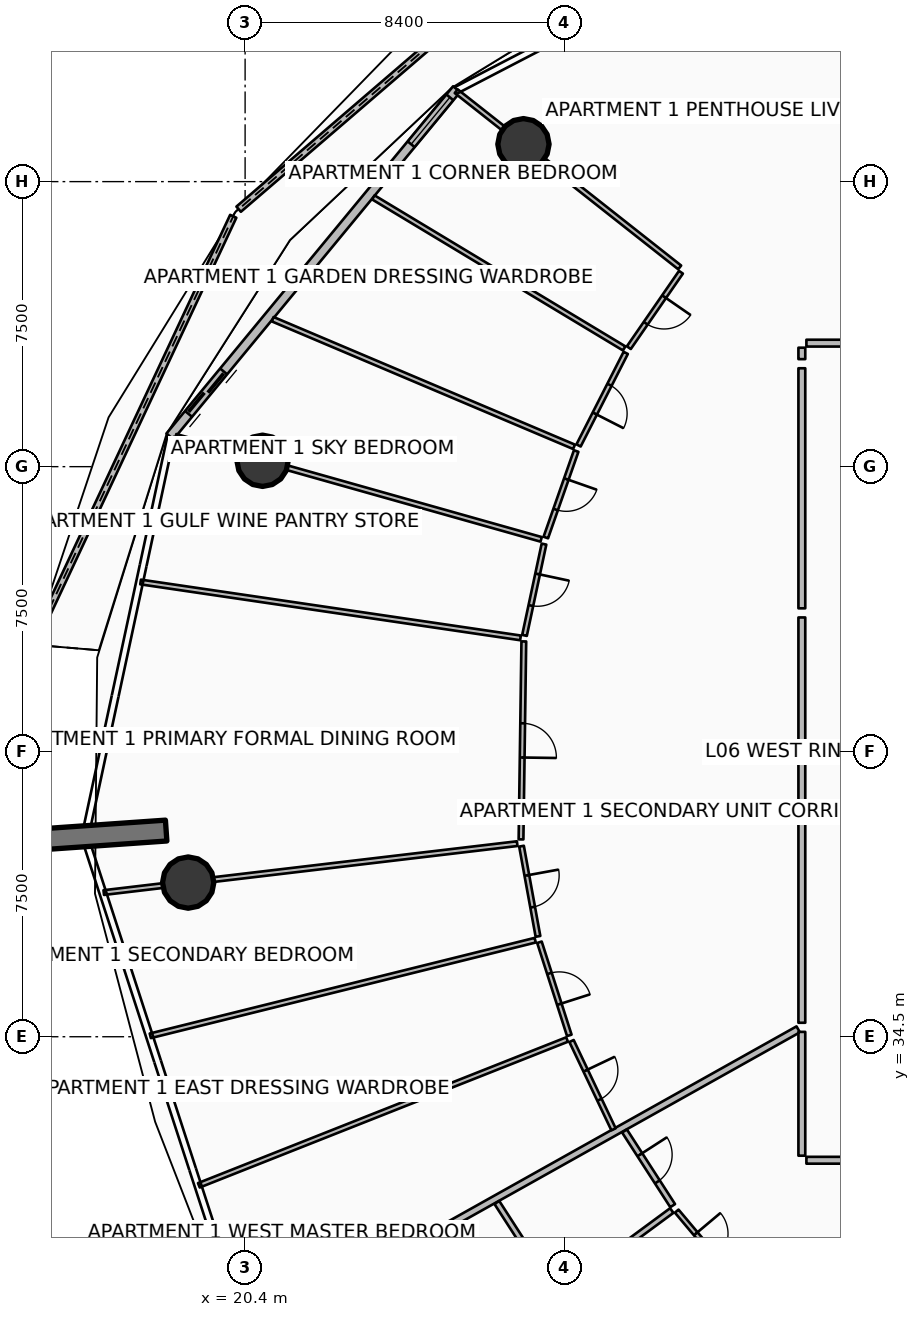
"""IFC4 building model, lengths in metres.
Left out: names, types, materials, properties, quantities, classifications, styles, units other than length and angle.
Written with IfcOpenShell. Run it as: python <this file> out.ifc"""

import sys

from ifc_helpers import new_model, si_unit, direction, frame, frame_2d, origin, origin_2d, place, context, subcontext, project, spatial, polyline, rectangle, circle, outline, extrude, element, fill, save


model = new_model("IFC4")
c1 = context("Model", 3, precision=1e-05, world=origin(), true_north=direction((0.0, 1.0)))
c2 = subcontext(c1, "Body", "Model", "MODEL_VIEW")
j1 = project(units=[si_unit("LENGTHUNIT", "METRE"), si_unit("PLANEANGLEUNIT", "RADIAN")], contexts=[c1])
p1 = place(None, origin())
s1 = spatial("IfcSite", under=j1, at=p1, CompositionType="ELEMENT")
p2 = place(p1, origin())
s2 = spatial("IfcBuilding", under=s1, at=p2, CompositionType="ELEMENT")
p3 = place(p2, frame((0.0, 0.0, 30.15)))
s3 = spatial("IfcBuildingStorey", under=s2, at=p3, CompositionType="ELEMENT", Elevation=30.15)
p4 = place(p3, frame((18.322, 39.925, 0.0), z_axis=(0.0, 0.0, 1.0), x_axis=(-0.997564163539, -0.069754853754, 0.0)))
e1 = element("IfcWall", 1, at=p4, inside=s3, PredefinedType="SOLIDWALL", context=c2, shape_type="SweptSolid", body=[
    extrude(rectangle(XDim=3.5, YDim=0.55, at=frame_2d((1.75, 0.0))), origin(), (0.0, 0.0, 1.0), 3.75),
])
for number, where, z_axis, x_axis in (
    (2, (27.724, 57.984, 0.0), (0.0, 0.0, 1.0), (1.0, 0.0, 0.0)),
    (3, (20.859, 49.655, 0.0), (0.0, 0.0, 1.0), (1.0, 0.0, 0.0)),
    (4, (18.902, 38.556, 0.0), (0.0, 0.0, 1.0), (1.0, 0.0, 0.0)),
):
    element("IfcColumn", number, at=place(p3, frame(where, z_axis=z_axis, x_axis=x_axis)), inside=s3, PredefinedType="COLUMN", context=c2, shape_type="SweptSolid", body=[
        extrude(circle(Radius=0.675, at=origin_2d()), origin(), (0.0, 0.0, 1.0), 3.5),
    ])
p5 = place(p3, frame((29.08, 63.881, 0.0), z_axis=(0.0, 0.0, 1.0), x_axis=(-0.758371329303, -0.651822772609, 0.0)))
e5 = element("IfcWall", 5, at=p5, inside=s3, PredefinedType="PARAPET", context=c2, shape_type="SweptSolid", body=[
    extrude(outline(polyline([(0.0, 0.0), (11.67, 0.0), (11.67, 1.148), (5.835, 1.284), (0.0, 1.483), (0.0, 0.0)])), frame((0.0, 0.09, 0.0), z_axis=(0.0, -1.0, 0.0), x_axis=(1.0, 0.0, 0.0)), (0.0, 0.0, 1.0), 0.18),
])
p6 = place(p3, frame((20.088, 56.087, 0.0), z_axis=(0.0, 0.0, 1.0), x_axis=(-0.424187605295, -0.905574334615, 0.0)))
e6 = element("IfcWall", 6, at=p6, inside=s3, PredefinedType="PARAPET", context=c2, shape_type="SweptSolid", body=[
    extrude(outline(polyline([(0.0, 0.0), (12.446, 0.0), (12.446, 1.224), (6.223, 1.127), (0.0, 1.148), (0.0, 0.0)])), frame((0.0, 0.09, 0.0), z_axis=(0.0, -1.0, 0.0), x_axis=(1.0, 0.0, 0.0)), (0.0, 0.0, 1.0), 0.18),
])
p7 = place(p3, frame((25.967, 59.433, 0.0), z_axis=(0.0, 0.0, 1.0), x_axis=(-0.636674332663, -0.771132799281, 0.0)))
e7 = element("IfcWall", 7, at=p7, inside=s3, PredefinedType="SOLIDWALL", context=c2, shape_type="SweptSolid", body=[
    extrude(rectangle(XDim=11.851, YDim=0.24, at=frame_2d((5.926, 0.0))), origin(), (0.0, 0.0, 1.0), 2.45),
])
p8 = place(p7, frame((9.631, 0.0, 0.0)))
e8 = element("IfcOpeningElement", 8, at=p8, cuts=e7, PredefinedType="OPENING", context=c2, shape_type="SweptSolid", body=[
    extrude(rectangle(XDim=1.45, YDim=2.15, at=frame_2d((0.725, 1.075))), frame((0.0, 0.13, 0.0), z_axis=(0.0, -1.0, 0.0), x_axis=(1.0, 0.0, 0.0)), (0.0, 0.0, 1.0), 0.26),
])
p9 = place(p7, frame((0.28, 0.0, 0.65)))
e9 = element("IfcOpeningElement", 9, at=p9, cuts=e7, PredefinedType="OPENING", context=c2, shape_type="SweptSolid", body=[
    extrude(rectangle(XDim=1.6, YDim=1.5, at=frame_2d((0.8, 0.75))), frame((0.0, 0.13, 0.0), z_axis=(0.0, -1.0, 0.0), x_axis=(1.0, 0.0, 0.0)), (0.0, 0.0, 1.0), 0.26),
])
p10 = place(p3, frame((34.954, 34.694, 0.0), z_axis=(0.0, 0.0, 1.0), x_axis=(-0.872493465611, -0.488625779577, 0.0)))
e10 = element("IfcWall", 10, at=p10, inside=s3, PredefinedType="PARTITIONING", context=c2, shape_type="SweptSolid", body=[
    extrude(rectangle(XDim=16.586, YDim=0.18, at=frame_2d((8.293, 0.0))), origin(), (0.0, 0.0, 1.0), 2.867),
])
p11 = place(p3, frame((41.86, 52.75, 0.0), z_axis=(0.0, 0.0, 1.0), x_axis=(-1.0, 0.0, 0.0)))
e11 = element("IfcWall", 11, at=p11, inside=s3, PredefinedType="PARTITIONING", context=c2, shape_type="SweptSolid", body=[
    extrude(rectangle(XDim=6.69, YDim=0.18, at=frame_2d((3.345, 0.0))), origin(), (0.0, 0.0, 1.0), 2.867),
])
p12 = place(p11, frame((2.795, 0.0, 0.0)))
e12 = element("IfcOpeningElement", 12, at=p12, cuts=e11, PredefinedType="OPENING", context=c2, shape_type="SweptSolid", body=[
    extrude(rectangle(XDim=1.1, YDim=2.1, at=frame_2d((0.55, 1.05))), frame((0.0, 0.1, 0.0), z_axis=(0.0, -1.0, 0.0), x_axis=(1.0, 0.0, 0.0)), (0.0, 0.0, 1.0), 0.2),
])
p13 = place(p3, frame((35.05, 52.63, 0.0), z_axis=(0.0, 0.0, 1.0), x_axis=(0.0, -1.0, 0.0)))
e13 = element("IfcWall", 13, at=p13, inside=s3, PredefinedType="PARTITIONING", context=c2, shape_type="SweptSolid", body=[
    extrude(rectangle(XDim=0.301, YDim=0.18, at=frame_2d((0.15, 0.0))), origin(), (0.0, 0.0, 1.0), 2.867),
])
p14 = place(p3, frame((37.943, 59.958, 0.0), z_axis=(0.0, 0.0, 1.0), x_axis=(-0.488606395453, 0.872504321091, 0.0)))
e14 = element("IfcWall", 14, at=p14, inside=s3, PredefinedType="PARTITIONING", context=c2, shape_type="SweptSolid", body=[
    extrude(rectangle(XDim=4.913, YDim=0.125, at=frame_2d((2.457, 0.0))), origin(), (0.0, 0.0, 1.0), 2.867),
])
p15 = place(p3, frame((35.05, 52.089, 0.0), z_axis=(0.0, 0.0, 1.0), x_axis=(0.0, -1.0, 0.0)))
e15 = element("IfcWall", 15, at=p15, inside=s3, PredefinedType="PARTITIONING", context=c2, shape_type="SweptSolid", body=[
    extrude(rectangle(XDim=6.317, YDim=0.18, at=frame_2d((3.158, 0.0))), origin(), (0.0, 0.0, 1.0), 2.867),
])
p16 = place(p3, frame((31.836, 54.743, 0.0), z_axis=(0.0, 0.0, 1.0), x_axis=(-0.785333171854, 0.619073347178, 0.0)))
e16 = element("IfcWall", 16, at=p16, inside=s3, PredefinedType="PARTITIONING", context=c2, shape_type="SweptSolid", body=[
    extrude(rectangle(XDim=7.489, YDim=0.125, at=frame_2d((3.745, 0.0))), origin(), (0.0, 0.0, 1.0), 2.867),
])
p17 = place(p3, frame((30.375, 52.611, 0.0), z_axis=(0.0, 0.0, 1.0), x_axis=(-0.856697740307, 0.515818748936, 0.0)))
e17 = element("IfcWall", 17, at=p17, inside=s3, PredefinedType="PARTITIONING", context=c2, shape_type="SweptSolid", body=[
    extrude(rectangle(XDim=7.704, YDim=0.125, at=frame_2d((3.852, 0.0))), origin(), (0.0, 0.0, 1.0), 2.94),
])
p18 = place(p3, frame((29.055, 50.022, 0.0), z_axis=(0.0, 0.0, 1.0), x_axis=(-0.920841617163, 0.389936810395, 0.0)))
e18 = element("IfcWall", 18, at=p18, inside=s3, PredefinedType="PARTITIONING", context=c2, shape_type="SweptSolid", body=[
    extrude(rectangle(XDim=8.613, YDim=0.125, at=frame_2d((4.306, 0.0))), origin(), (0.0, 0.0, 1.0), 2.94),
])
p19 = place(p3, frame((31.869, 54.615, 0.0), z_axis=(0.0, 0.0, 1.0), x_axis=(-0.568588801709, -0.822621890404, 0.0)))
e19 = element("IfcWall", 19, at=p19, inside=s3, PredefinedType="PARTITIONING", context=c2, shape_type="SweptSolid", body=[
    extrude(rectangle(XDim=2.412, YDim=0.125, at=frame_2d((1.206, 0.0))), origin(), (0.0, 0.0, 1.0), 2.867),
])
p20 = place(p19, frame((0.781, 0.0, 0.0)))
e20 = element("IfcOpeningElement", 20, at=p20, cuts=e19, PredefinedType="OPENING", context=c2, shape_type="SweptSolid", body=[
    extrude(rectangle(XDim=0.85, YDim=2.06, at=frame_2d((0.425, 1.03))), frame((0.0, 0.073, 0.0), z_axis=(0.0, -1.0, 0.0), x_axis=(1.0, 0.0, 0.0)), (0.0, 0.0, 1.0), 0.145),
])
p21 = place(p3, frame((30.416, 52.493, 0.0), z_axis=(0.0, 0.0, 1.0), x_axis=(-0.454024795493, -0.890989048798, 0.0)))
e21 = element("IfcWall", 21, at=p21, inside=s3, PredefinedType="PARTITIONING", context=c2, shape_type="SweptSolid", body=[
    extrude(rectangle(XDim=2.733, YDim=0.125, at=frame_2d((1.367, 0.0))), origin(), (0.0, 0.0, 1.0), 2.94),
])
p22 = place(p21, frame((0.942, 0.0, 0.0)))
e22 = element("IfcOpeningElement", 22, at=p22, cuts=e21, PredefinedType="OPENING", context=c2, shape_type="SweptSolid", body=[
    extrude(rectangle(XDim=0.85, YDim=2.06, at=frame_2d((0.425, 1.03))), frame((0.0, 0.073, 0.0), z_axis=(0.0, -1.0, 0.0), x_axis=(1.0, 0.0, 0.0)), (0.0, 0.0, 1.0), 0.145),
])
p23 = place(p3, frame((29.112, 49.911, 0.0), z_axis=(0.0, 0.0, 1.0), x_axis=(-0.331369117911, -0.943501196446, 0.0)))
e23 = element("IfcWall", 23, at=p23, inside=s3, PredefinedType="PARTITIONING", context=c2, shape_type="SweptSolid", body=[
    extrude(rectangle(XDim=2.412, YDim=0.125, at=frame_2d((1.206, 0.0))), origin(), (0.0, 0.0, 1.0), 2.867),
])
p24 = place(p23, frame((0.781, 0.0, 0.0)))
e24 = element("IfcOpeningElement", 24, at=p24, cuts=e23, PredefinedType="OPENING", context=c2, shape_type="SweptSolid", body=[
    extrude(rectangle(XDim=0.85, YDim=2.06, at=frame_2d((0.425, 1.03))), frame((0.0, 0.073, 0.0), z_axis=(0.0, -1.0, 0.0), x_axis=(1.0, 0.0, 0.0)), (0.0, 0.0, 1.0), 0.145),
])
p25 = place(p3, frame((35.05, 45.532, 0.0), z_axis=(0.0, 0.0, 1.0), x_axis=(0.0, -1.0, 0.0)))
e25 = element("IfcWall", 25, at=p25, inside=s3, PredefinedType="PARTITIONING", context=c2, shape_type="SweptSolid", body=[
    extrude(rectangle(XDim=4.945, YDim=0.18, at=frame_2d((2.472, 0.0))), origin(), (0.0, 0.0, 1.0), 2.867),
])
p26 = place(p3, frame((28.19, 47.587, 0.0), z_axis=(0.0, 0.0, 1.0), x_axis=(-0.962452458747, 0.271450298675, 0.0)))
e26 = element("IfcWall", 26, at=p26, inside=s3, PredefinedType="PARTITIONING", context=c2, shape_type="SweptSolid", body=[
    extrude(rectangle(XDim=9.991, YDim=0.125, at=frame_2d((4.996, 0.0))), origin(), (0.0, 0.0, 1.0), 2.867),
])
p27 = place(p3, frame((27.646, 44.995, 0.0), z_axis=(0.0, 0.0, 1.0), x_axis=(-0.989346856364, 0.145577463234, 0.0)))
e27 = element("IfcWall", 27, at=p27, inside=s3, PredefinedType="PARTITIONING", context=c2, shape_type="SweptSolid", body=[
    extrude(rectangle(XDim=10.104, YDim=0.125, at=frame_2d((5.052, 0.0))), origin(), (0.0, 0.0, 1.0), 2.94),
])
p28 = place(p3, frame((28.265, 47.462, 0.0), z_axis=(0.0, 0.0, 1.0), x_axis=(-0.20890462523, -0.977936019153, 0.0)))
e28 = element("IfcWall", 28, at=p28, inside=s3, PredefinedType="PARTITIONING", context=c2, shape_type="SweptSolid", body=[
    extrude(rectangle(XDim=2.457, YDim=0.125, at=frame_2d((1.228, 0.0))), origin(), (0.0, 0.0, 1.0), 2.867),
])
p29 = place(p28, frame((0.803, 0.0, 0.0)))
e29 = element("IfcOpeningElement", 29, at=p29, cuts=e28, PredefinedType="OPENING", context=c2, shape_type="SweptSolid", body=[
    extrude(rectangle(XDim=0.85, YDim=2.06, at=frame_2d((0.425, 1.03))), frame((0.0, 0.073, 0.0), z_axis=(0.0, -1.0, 0.0), x_axis=(1.0, 0.0, 0.0)), (0.0, 0.0, 1.0), 0.145),
])
p30 = place(p3, frame((27.734, 44.902, 0.0), z_axis=(0.0, 0.0, 1.0), x_axis=(-0.014152399805, -0.999899849775, 0.0)))
e30 = element("IfcWall", 30, at=p30, inside=s3, PredefinedType="PARTITIONING", context=c2, shape_type="SweptSolid", body=[
    extrude(rectangle(XDim=5.21, YDim=0.125, at=frame_2d((2.605, 0.0))), origin(), (0.0, 0.0, 1.0), 2.867),
])
p31 = place(p30, frame((2.155, 0.0, 0.0)))
e31 = element("IfcOpeningElement", 31, at=p31, cuts=e30, PredefinedType="OPENING", context=c2, shape_type="SweptSolid", body=[
    extrude(rectangle(XDim=0.9, YDim=2.08, at=frame_2d((0.45, 1.04))), frame((0.0, 0.073, 0.0), z_axis=(0.0, -1.0, 0.0), x_axis=(1.0, 0.0, 0.0)), (0.0, 0.0, 1.0), 0.145),
])
p32 = place(p3, frame((35.05, 40.347, 0.0), z_axis=(0.0, 0.0, 1.0), x_axis=(0.0, -1.0, 0.0)))
e32 = element("IfcWall", 32, at=p32, inside=s3, PredefinedType="PARTITIONING", context=c2, shape_type="SweptSolid", body=[
    extrude(rectangle(XDim=5.48, YDim=0.18, at=frame_2d((2.74, 0.0))), origin(), (0.0, 0.0, 1.0), 2.867),
])
p33 = place(p3, frame((27.56, 39.581, 0.0), z_axis=(0.0, 0.0, 1.0), x_axis=(-0.993067148518, -0.117548451854, 0.0)))
e33 = element("IfcWall", 33, at=p33, inside=s3, PredefinedType="PARTITIONING", context=c2, shape_type="SweptSolid", body=[
    extrude(rectangle(XDim=10.956, YDim=0.125, at=frame_2d((5.478, 0.0))), origin(), (0.0, 0.0, 1.0), 2.867),
])
p34 = place(p3, frame((28.034, 37.04, 0.0), z_axis=(0.0, 0.0, 1.0), x_axis=(-0.970510155377, -0.241060237928, 0.0)))
e34 = element("IfcWall", 34, at=p34, inside=s3, PredefinedType="PARTITIONING", context=c2, shape_type="SweptSolid", body=[
    extrude(rectangle(XDim=10.437, YDim=0.125, at=frame_2d((5.218, 0.0))), origin(), (0.0, 0.0, 1.0), 2.94),
])
p35 = place(p3, frame((28.872, 34.427, 0.0), z_axis=(0.0, 0.0, 1.0), x_axis=(-0.929776542834, -0.368124408855, 0.0)))
e35 = element("IfcWall", 35, at=p35, inside=s3, PredefinedType="PARTITIONING", context=c2, shape_type="SweptSolid", body=[
    extrude(rectangle(XDim=10.42, YDim=0.125, at=frame_2d((5.21, 0.0))), origin(), (0.0, 0.0, 1.0), 2.94),
])
p36 = place(p3, frame((27.673, 39.514, 0.0), z_axis=(0.0, 0.0, 1.0), x_axis=(0.179642413558, -0.983731977345, 0.0)))
e36 = element("IfcWall", 36, at=p36, inside=s3, PredefinedType="PARTITIONING", context=c2, shape_type="SweptSolid", body=[
    extrude(rectangle(XDim=2.412, YDim=0.125, at=frame_2d((1.206, 0.0))), origin(), (0.0, 0.0, 1.0), 2.867),
])
p37 = place(p36, frame((0.781, 0.0, 0.0)))
e37 = element("IfcOpeningElement", 37, at=p37, cuts=e36, PredefinedType="OPENING", context=c2, shape_type="SweptSolid", body=[
    extrude(rectangle(XDim=0.85, YDim=2.06, at=frame_2d((0.425, 1.03))), frame((0.0, 0.073, 0.0), z_axis=(0.0, -1.0, 0.0), x_axis=(1.0, 0.0, 0.0)), (0.0, 0.0, 1.0), 0.145),
])
p38 = place(p3, frame((28.146, 36.986, 0.0), z_axis=(0.0, 0.0, 1.0), x_axis=(0.305274947668, -0.952264252362, 0.0)))
e38 = element("IfcWall", 38, at=p38, inside=s3, PredefinedType="PARTITIONING", context=c2, shape_type="SweptSolid", body=[
    extrude(rectangle(XDim=2.573, YDim=0.125, at=frame_2d((1.286, 0.0))), origin(), (0.0, 0.0, 1.0), 2.94),
])
p39 = place(p38, frame((0.861, 0.0, 0.0)))
e39 = element("IfcOpeningElement", 39, at=p39, cuts=e38, PredefinedType="OPENING", context=c2, shape_type="SweptSolid", body=[
    extrude(rectangle(XDim=0.85, YDim=2.06, at=frame_2d((0.425, 1.03))), frame((0.0, 0.073, 0.0), z_axis=(0.0, -1.0, 0.0), x_axis=(1.0, 0.0, 0.0)), (0.0, 0.0, 1.0), 0.145),
])
p40 = place(p3, frame((28.99, 34.387, 0.0), z_axis=(0.0, 0.0, 1.0), x_axis=(0.429399392499, -0.903114700202, 0.0)))
e40 = element("IfcWall", 40, at=p40, inside=s3, PredefinedType="PARTITIONING", context=c2, shape_type="SweptSolid", body=[
    extrude(rectangle(XDim=2.573, YDim=0.125, at=frame_2d((1.286, 0.0))), origin(), (0.0, 0.0, 1.0), 2.867),
])
p41 = place(p40, frame((0.861, 0.0, 0.0)))
e41 = element("IfcOpeningElement", 41, at=p41, cuts=e40, PredefinedType="OPENING", context=c2, shape_type="SweptSolid", body=[
    extrude(rectangle(XDim=0.85, YDim=2.06, at=frame_2d((0.425, 1.03))), frame((0.0, 0.073, 0.0), z_axis=(0.0, -1.0, 0.0), x_axis=(1.0, 0.0, 0.0)), (0.0, 0.0, 1.0), 0.145),
])
p42 = place(p3, frame((35.05, 34.628, 0.0), z_axis=(0.0, 0.0, 1.0), x_axis=(0.0, -1.0, 0.0)))
e42 = element("IfcWall", 42, at=p42, inside=s3, PredefinedType="PARTITIONING", context=c2, shape_type="SweptSolid", body=[
    extrude(rectangle(XDim=3.258, YDim=0.18, at=frame_2d((1.629, 0.0))), origin(), (0.0, 0.0, 1.0), 2.867),
])
p43 = place(p3, frame((35.17, 31.25, 0.0), z_axis=(0.0, 0.0, 1.0), x_axis=(1.0, 0.0, 0.0)))
e43 = element("IfcWall", 43, at=p43, inside=s3, PredefinedType="PARTITIONING", context=c2, shape_type="SweptSolid", body=[
    extrude(rectangle(XDim=4.236, YDim=0.18, at=frame_2d((2.118, 0.0))), origin(), (0.0, 0.0, 1.0), 2.867),
])
p44 = place(p3, frame((30.384, 32.02, 0.0), z_axis=(0.0, 0.0, 1.0), x_axis=(0.542055500246, -0.84034268882, 0.0)))
e44 = element("IfcWall", 44, at=p44, inside=s3, PredefinedType="PARTITIONING", context=c2, shape_type="SweptSolid", body=[
    extrude(rectangle(XDim=2.338, YDim=0.15, at=frame_2d((1.169, 0.0))), origin(), (0.0, 0.0, 1.0), 2.867),
])
p45 = place(p44, frame((0.744, 0.0, 0.0)))
e45 = element("IfcOpeningElement", 45, at=p45, cuts=e44, PredefinedType="OPENING", context=c2, shape_type="SweptSolid", body=[
    extrude(rectangle(XDim=0.85, YDim=2.06, at=frame_2d((0.425, 1.03))), frame((0.0, 0.085, 0.0), z_axis=(0.0, -1.0, 0.0), x_axis=(1.0, 0.0, 0.0)), (0.0, 0.0, 1.0), 0.17),
])
p46 = place(p3, frame((27.024, 30.139, 0.0), z_axis=(0.0, 0.0, 1.0), x_axis=(0.542061750335, -0.840338657223, 0.0)))
e46 = element("IfcWall", 46, at=p46, inside=s3, PredefinedType="PARTITIONING", context=c2, shape_type="SweptSolid", body=[
    extrude(rectangle(XDim=2.818, YDim=0.15, at=frame_2d((1.409, 0.0))), origin(), (0.0, 0.0, 1.0), 2.867),
])
p47 = place(p3, frame((31.627, 29.927, 0.0), z_axis=(0.0, 0.0, 1.0), x_axis=(-0.804824851799, -0.59351239071, 0.0)))
e47 = element("IfcWall", 47, at=p47, inside=s3, PredefinedType="PARTITIONING", context=c2, shape_type="SweptSolid", body=[
    extrude(rectangle(XDim=3.72, YDim=0.15, at=frame_2d((1.86, 0.0))), origin(), (0.0, 0.0, 1.0), 2.94),
])
p48 = place(p3, frame((31.757, 29.911, 0.0), z_axis=(0.0, 0.0, 1.0), x_axis=(0.643453951952, -0.76548482135, 0.0)))
e48 = element("IfcWall", 48, at=p48, inside=s3, PredefinedType="PARTITIONING", context=c2, shape_type="SweptSolid", body=[
    extrude(rectangle(XDim=2.405, YDim=0.125, at=frame_2d((1.202, 0.0))), origin(), (0.0, 0.0, 1.0), 2.94),
])
p49 = place(p48, frame((0.777, 0.0, 0.0)))
e49 = element("IfcOpeningElement", 49, at=p49, cuts=e48, PredefinedType="OPENING", context=c2, shape_type="SweptSolid", body=[
    extrude(rectangle(XDim=0.85, YDim=2.06, at=frame_2d((0.425, 1.03))), frame((0.0, 0.073, 0.0), z_axis=(0.0, -1.0, 0.0), x_axis=(1.0, 0.0, 0.0)), (0.0, 0.0, 1.0), 0.145),
])
p50 = place(p8, origin())
e50 = element("IfcDoor", 50, at=p50, inside=s3, OperationType="DOUBLE_DOOR_SLIDING", PredefinedType="DOOR", context=c2, shape_type="SweptSolid", body=[
    extrude(rectangle(XDim=1.45, YDim=2.15, at=frame_2d((0.725, 1.075))), frame((0.0, 0.025, 0.0), z_axis=(0.0, -1.0, 0.0), x_axis=(1.0, 0.0, 0.0)), (0.0, 0.0, 1.0), 0.05),
])
fill(e8, e50)
p51 = place(p9, origin())
e51 = element("IfcWindow", 51, at=p51, inside=s3, PartitioningType="SINGLE_PANEL", PredefinedType="WINDOW", context=c2, shape_type="SweptSolid", body=[
    extrude(rectangle(XDim=1.6, YDim=1.5, at=frame_2d((0.8, 0.75))), frame((0.0, 0.03, 0.0), z_axis=(0.0, -1.0, 0.0), x_axis=(1.0, 0.0, 0.0)), (0.0, 0.0, 1.0), 0.06),
])
fill(e9, e51)
p52 = place(p20, origin())
e52 = element("IfcDoor", 52, at=p52, inside=s3, OperationType="SINGLE_SWING_LEFT", PredefinedType="DOOR", context=c2, shape_type="SweptSolid", body=[
    extrude(rectangle(XDim=0.85, YDim=2.06, at=frame_2d((0.425, 1.03))), frame((0.0, 0.025, 0.0), z_axis=(0.0, -1.0, 0.0), x_axis=(1.0, 0.0, 0.0)), (0.0, 0.0, 1.0), 0.05),
])
fill(e20, e52)
p53 = place(p22, origin())
e53 = element("IfcDoor", 53, at=p53, inside=s3, OperationType="SINGLE_SWING_RIGHT", PredefinedType="DOOR", context=c2, shape_type="SweptSolid", body=[
    extrude(rectangle(XDim=0.85, YDim=2.06, at=frame_2d((0.425, 1.03))), frame((0.0, 0.025, 0.0), z_axis=(0.0, -1.0, 0.0), x_axis=(1.0, 0.0, 0.0)), (0.0, 0.0, 1.0), 0.05),
])
fill(e22, e53)
p54 = place(p24, origin())
e54 = element("IfcDoor", 54, at=p54, inside=s3, OperationType="SINGLE_SWING_LEFT", PredefinedType="DOOR", context=c2, shape_type="SweptSolid", body=[
    extrude(rectangle(XDim=0.85, YDim=2.06, at=frame_2d((0.425, 1.03))), frame((0.0, 0.025, 0.0), z_axis=(0.0, -1.0, 0.0), x_axis=(1.0, 0.0, 0.0)), (0.0, 0.0, 1.0), 0.05),
])
fill(e24, e54)
p55 = place(p29, origin())
e55 = element("IfcDoor", 55, at=p55, inside=s3, OperationType="SINGLE_SWING_LEFT", PredefinedType="DOOR", context=c2, shape_type="SweptSolid", body=[
    extrude(rectangle(XDim=0.85, YDim=2.06, at=frame_2d((0.425, 1.03))), frame((0.0, 0.025, 0.0), z_axis=(0.0, -1.0, 0.0), x_axis=(1.0, 0.0, 0.0)), (0.0, 0.0, 1.0), 0.05),
])
fill(e29, e55)
p56 = place(p31, origin())
e56 = element("IfcDoor", 56, at=p56, inside=s3, OperationType="SINGLE_SWING_RIGHT", PredefinedType="DOOR", context=c2, shape_type="SweptSolid", body=[
    extrude(rectangle(XDim=0.9, YDim=2.08, at=frame_2d((0.45, 1.04))), frame((0.0, 0.025, 0.0), z_axis=(0.0, -1.0, 0.0), x_axis=(1.0, 0.0, 0.0)), (0.0, 0.0, 1.0), 0.05),
])
fill(e31, e56)
p57 = place(p37, origin())
e57 = element("IfcDoor", 57, at=p57, inside=s3, OperationType="SINGLE_SWING_LEFT", PredefinedType="DOOR", context=c2, shape_type="SweptSolid", body=[
    extrude(rectangle(XDim=0.85, YDim=2.06, at=frame_2d((0.425, 1.03))), frame((0.0, 0.025, 0.0), z_axis=(0.0, -1.0, 0.0), x_axis=(1.0, 0.0, 0.0)), (0.0, 0.0, 1.0), 0.05),
])
fill(e37, e57)
p58 = place(p39, origin())
e58 = element("IfcDoor", 58, at=p58, inside=s3, OperationType="SINGLE_SWING_RIGHT", PredefinedType="DOOR", context=c2, shape_type="SweptSolid", body=[
    extrude(rectangle(XDim=0.85, YDim=2.06, at=frame_2d((0.425, 1.03))), frame((0.0, 0.025, 0.0), z_axis=(0.0, -1.0, 0.0), x_axis=(1.0, 0.0, 0.0)), (0.0, 0.0, 1.0), 0.05),
])
fill(e39, e58)
p59 = place(p41, origin())
e59 = element("IfcDoor", 59, at=p59, inside=s3, OperationType="SINGLE_SWING_LEFT", PredefinedType="DOOR", context=c2, shape_type="SweptSolid", body=[
    extrude(rectangle(XDim=0.85, YDim=2.06, at=frame_2d((0.425, 1.03))), frame((0.0, 0.025, 0.0), z_axis=(0.0, -1.0, 0.0), x_axis=(1.0, 0.0, 0.0)), (0.0, 0.0, 1.0), 0.05),
])
fill(e41, e59)
p60 = place(p45, origin())
e60 = element("IfcDoor", 60, at=p60, inside=s3, OperationType="SINGLE_SWING_LEFT", PredefinedType="DOOR", context=c2, shape_type="SweptSolid", body=[
    extrude(rectangle(XDim=0.85, YDim=2.06, at=frame_2d((0.425, 1.03))), frame((0.0, 0.025, 0.0), z_axis=(0.0, -1.0, 0.0), x_axis=(1.0, 0.0, 0.0)), (0.0, 0.0, 1.0), 0.05),
])
fill(e45, e60)
p61 = place(p49, origin())
e61 = element("IfcDoor", 61, at=p61, inside=s3, OperationType="SINGLE_SWING_LEFT", PredefinedType="DOOR", context=c2, shape_type="SweptSolid", body=[
    extrude(rectangle(XDim=0.85, YDim=2.06, at=frame_2d((0.425, 1.03))), frame((0.0, 0.025, 0.0), z_axis=(0.0, -1.0, 0.0), x_axis=(1.0, 0.0, 0.0)), (0.0, 0.0, 1.0), 0.05),
])
fill(e49, e61)
save(model, sys.argv[1])
